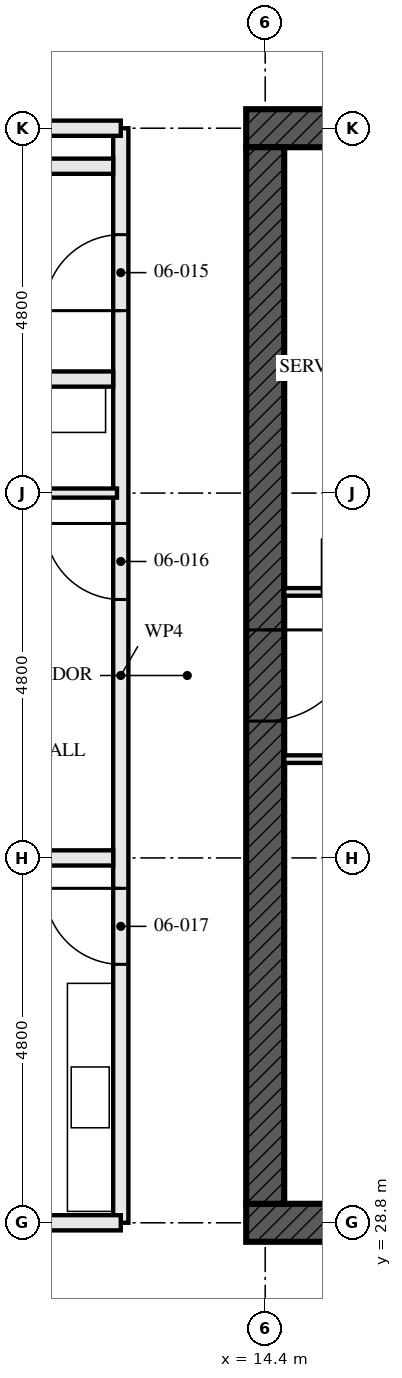
"""IFC4 building model, lengths in metres.
Left out: names, types, materials, properties, quantities, classifications, styles, units other than length and angle.
Written with IfcOpenShell. Run it as: python <this file> out.ifc"""

import sys

from ifc_helpers import new_model, si_unit, direction, frame, frame_2d, origin, place, context, subcontext, project, spatial, rectangle, extrude, element, fill, save


model = new_model("IFC4")
c1 = context("Model", 3, precision=1e-05, world=origin(), true_north=direction((0.0, 1.0)))
c2 = subcontext(c1, "Body", "Model", "MODEL_VIEW")
j1 = project(units=[si_unit("LENGTHUNIT", "METRE"), si_unit("PLANEANGLEUNIT", "RADIAN")], contexts=[c1])
p1 = place(None, origin())
s1 = spatial("IfcSite", under=j1, at=p1, CompositionType="ELEMENT")
p2 = place(p1, origin())
s2 = spatial("IfcBuilding", under=s1, at=p2, CompositionType="ELEMENT")
p3 = place(p2, frame((0.0, 0.0, 27.0)))
s3 = spatial("IfcBuildingStorey", under=s2, at=p3, CompositionType="ELEMENT", Elevation=27.0)
p4 = place(p3, frame((14.15, 28.8, -0.17), z_axis=(0.0, 0.0, 1.0), x_axis=(1.0, 0.0, 0.0)))
e1 = element("IfcWall", 1, at=p4, inside=s3, PredefinedType="SHEAR", context=c2, shape_type="SweptSolid", body=[
    extrude(rectangle(XDim=14.9, YDim=0.5, at=frame_2d((7.45, 0.0))), origin(), (0.0, 0.0, 1.0), 3.5),
])
p5 = place(p4, frame((6.85, 0.0, 0.17)))
e2 = element("IfcOpeningElement", 2, at=p5, cuts=e1, PredefinedType="OPENING", context=c2, shape_type="SweptSolid", body=[
    extrude(rectangle(XDim=1.2, YDim=2.1, at=frame_2d((0.6, 1.05))), frame((0.0, 0.26, 0.0), z_axis=(0.0, -1.0, 0.0), x_axis=(1.0, 0.0, 0.0)), (0.0, 0.0, 1.0), 0.521),
])
p6 = place(p3, frame((29.05, 43.2, -0.17), z_axis=(0.0, 0.0, 1.0), x_axis=(-1.0, 0.0, 0.0)))
e3 = element("IfcWall", 3, at=p6, inside=s3, PredefinedType="SHEAR", context=c2, shape_type="SweptSolid", body=[
    extrude(rectangle(XDim=14.9, YDim=0.5, at=frame_2d((7.45, 0.0))), origin(), (0.0, 0.0, 1.0), 3.5),
])
p7 = place(p6, frame((6.85, 0.0, 0.17)))
e4 = element("IfcOpeningElement", 4, at=p7, cuts=e3, PredefinedType="OPENING", context=c2, shape_type="SweptSolid", body=[
    extrude(rectangle(XDim=1.2, YDim=2.1, at=frame_2d((0.6, 1.05))), frame((0.0, 0.26, 0.0), z_axis=(0.0, -1.0, 0.0), x_axis=(1.0, 0.0, 0.0)), (0.0, 0.0, 1.0), 0.521),
])
p8 = place(p3, frame((14.4, 42.95, -0.17), z_axis=(0.0, 0.0, 1.0), x_axis=(0.0, -1.0, 0.0)))
e5 = element("IfcWall", 5, at=p8, inside=s3, PredefinedType="SHEAR", context=c2, shape_type="SweptSolid", body=[
    extrude(rectangle(XDim=13.9, YDim=0.5, at=frame_2d((6.95, 0.0))), origin(), (0.0, 0.0, 1.0), 3.5),
])
p9 = place(p8, frame((6.35, 0.0, 0.17)))
e6 = element("IfcOpeningElement", 6, at=p9, cuts=e5, PredefinedType="OPENING", context=c2, shape_type="SweptSolid", body=[
    extrude(rectangle(XDim=1.2, YDim=2.1, at=frame_2d((0.6, 1.05))), frame((0.0, 0.26, 0.0), z_axis=(0.0, -1.0, 0.0), x_axis=(1.0, 0.0, 0.0)), (0.0, 0.0, 1.0), 0.521),
])
for number, where, z_axis, x_axis in (
    (7, (7.7, 42.7, 0.0), (0.0, 0.0, 1.0), (1.0, 0.0, 0.0)),
    (8, (7.7, 39.9, 0.0), (0.0, 0.0, 1.0), (1.0, 0.0, 0.0)),
):
    element("IfcWall", number, at=place(p3, frame(where, z_axis=z_axis, x_axis=x_axis)), inside=s3, PredefinedType="SOLIDWALL", context=c2, shape_type="SweptSolid", body=[
        extrude(rectangle(XDim=4.7, YDim=0.2, at=frame_2d((2.35, 0.0))), origin(), (0.0, 0.0, 1.0), 2.99),
    ])
p10 = place(p3, frame((6.4, 38.4, 0.0), z_axis=(0.0, 0.0, 1.0), x_axis=(1.0, 0.0, 0.0)))
e9 = element("IfcWall", 9, at=p10, inside=s3, PredefinedType="PARTITIONING", context=c2, shape_type="SweptSolid", body=[
    extrude(rectangle(XDim=6.05, YDim=0.12, at=frame_2d((3.025, 0.0))), origin(), (0.0, 0.0, 1.0), 2.55),
])
p11 = place(p10, frame((2.575, 0.0, 0.0)))
e10 = element("IfcOpeningElement", 10, at=p11, cuts=e9, PredefinedType="OPENING", context=c2, shape_type="SweptSolid", body=[
    extrude(rectangle(XDim=0.9, YDim=2.1, at=frame_2d((0.45, 1.05))), frame((0.0, 0.071, 0.0), z_axis=(0.0, -1.0, 0.0), x_axis=(1.0, 0.0, 0.0)), (0.0, 0.0, 1.0), 0.141),
])
p12 = place(p3, frame((0.395, 33.6, 0.0), z_axis=(0.0, 0.0, 1.0), x_axis=(1.0, 0.0, 0.0)))
e11 = element("IfcWall", 11, at=p12, inside=s3, PredefinedType="PARTITIONING", context=c2, shape_type="SweptSolid", body=[
    extrude(rectangle(XDim=12.005, YDim=0.2, at=frame_2d((6.002, 0.0))), origin(), (0.0, 0.0, 1.0), 2.55),
])
p13 = place(p3, frame((12.5, 43.2, 0.0), z_axis=(0.0, 0.0, 1.0), x_axis=(0.0, -1.0, 0.0)))
e12 = element("IfcWall", 12, at=p13, inside=s3, PredefinedType="PARTITIONING", context=c2, shape_type="SweptSolid", body=[
    extrude(rectangle(XDim=14.4, YDim=0.2, at=frame_2d((7.2, 0.0))), origin(), (0.0, 0.0, 1.0), 2.55),
])
p14 = place(p13, frame((1.4, 0.0, 0.0)))
e13 = element("IfcOpeningElement", 13, at=p14, cuts=e12, PredefinedType="OPENING", context=c2, shape_type="SweptSolid", body=[
    extrude(rectangle(XDim=1.0, YDim=2.1, at=frame_2d((0.5, 1.05))), frame((0.0, 0.111, 0.0), z_axis=(0.0, -1.0, 0.0), x_axis=(1.0, 0.0, 0.0)), (0.0, 0.0, 1.0), 0.221),
])
p15 = place(p13, frame((5.2, 0.0, 0.0)))
e14 = element("IfcOpeningElement", 14, at=p15, cuts=e12, PredefinedType="OPENING", context=c2, shape_type="SweptSolid", body=[
    extrude(rectangle(XDim=1.0, YDim=2.1, at=frame_2d((0.5, 1.05))), frame((0.0, 0.111, 0.0), z_axis=(0.0, -1.0, 0.0), x_axis=(1.0, 0.0, 0.0)), (0.0, 0.0, 1.0), 0.221),
])
p16 = place(p13, frame((10.0, 0.0, 0.0)))
e15 = element("IfcOpeningElement", 15, at=p16, cuts=e12, PredefinedType="OPENING", context=c2, shape_type="SweptSolid", body=[
    extrude(rectangle(XDim=1.0, YDim=2.1, at=frame_2d((0.5, 1.05))), frame((0.0, 0.111, 0.0), z_axis=(0.0, -1.0, 0.0), x_axis=(1.0, 0.0, 0.0)), (0.0, 0.0, 1.0), 0.221),
])
p17 = place(p3, frame((14.65, 34.9, 0.0), z_axis=(0.0, 0.0, 1.0), x_axis=(1.0, 0.0, 0.0)))
e16 = element("IfcWall", 16, at=p17, inside=s3, PredefinedType="SOLIDWALL", context=c2, shape_type="SweptSolid", body=[
    extrude(rectangle(XDim=5.9, YDim=0.1, at=frame_2d((2.95, 0.0))), origin(), (0.0, 0.0, 1.0), 3.33),
])
p18 = place(p17, frame((1.6, 0.0, 0.0)))
e17 = element("IfcOpeningElement", 17, at=p18, cuts=e16, PredefinedType="OPENING", context=c2, shape_type="SweptSolid", body=[
    extrude(rectangle(XDim=0.7, YDim=2.1, at=frame_2d((0.35, 1.05))), frame((0.0, 0.061, 0.0), z_axis=(0.0, -1.0, 0.0), x_axis=(1.0, 0.0, 0.0)), (0.0, 0.0, 1.0), 0.121),
])
p19 = place(p3, frame((14.65, 37.1, 0.0), z_axis=(0.0, 0.0, 1.0), x_axis=(1.0, 0.0, 0.0)))
e18 = element("IfcWall", 18, at=p19, inside=s3, PredefinedType="SOLIDWALL", context=c2, shape_type="SweptSolid", body=[
    extrude(rectangle(XDim=5.9, YDim=0.1, at=frame_2d((2.95, 0.0))), origin(), (0.0, 0.0, 1.0), 3.33),
])
p20 = place(p19, frame((0.5, 0.0, 0.0)))
e19 = element("IfcOpeningElement", 19, at=p20, cuts=e18, PredefinedType="OPENING", context=c2, shape_type="SweptSolid", body=[
    extrude(rectangle(XDim=0.7, YDim=2.1, at=frame_2d((0.35, 1.05))), frame((0.0, 0.061, 0.0), z_axis=(0.0, -1.0, 0.0), x_axis=(1.0, 0.0, 0.0)), (0.0, 0.0, 1.0), 0.121),
])
p21 = place(p19, frame((1.85, 0.0, 0.0)))
e20 = element("IfcOpeningElement", 20, at=p21, cuts=e18, PredefinedType="OPENING", context=c2, shape_type="SweptSolid", body=[
    extrude(rectangle(XDim=0.9, YDim=2.1, at=frame_2d((0.45, 1.05))), frame((0.0, 0.061, 0.0), z_axis=(0.0, -1.0, 0.0), x_axis=(1.0, 0.0, 0.0)), (0.0, 0.0, 1.0), 0.121),
])
for number, where, z_axis, x_axis in (
    (21, (12.5, 28.8, 0.0), (0.0, 0.0, 1.0), (-1.0, 0.0, 0.0)),
    (22, (12.5, 43.2, 0.0), (0.0, 0.0, 1.0), (-1.0, 0.0, 0.0)),
):
    element("IfcWall", number, at=place(p3, frame(where, z_axis=z_axis, x_axis=x_axis)), inside=s3, PredefinedType="PARTITIONING", context=c2, shape_type="SweptSolid", body=[
        extrude(rectangle(XDim=2.505, YDim=0.2, at=frame_2d((1.252, 0.0))), origin(), (0.0, 0.0, 1.0), 2.32),
    ])
p22 = place(p14, frame((1.0, 0.0, 0.0), z_axis=(0.0, 0.0, 1.0), x_axis=(-1.0, 0.0, 0.0)))
e23 = element("IfcDoor", 23, at=p22, inside=s3, OperationType="SINGLE_SWING_RIGHT", PredefinedType="DOOR", context=c2, shape_type="SweptSolid", body=[
    extrude(rectangle(XDim=1.0, YDim=2.1, at=frame_2d((0.5, 1.05))), frame((0.0, 0.032, 0.0), z_axis=(0.0, -1.0, 0.0), x_axis=(1.0, 0.0, 0.0)), (0.0, 0.0, 1.0), 0.064),
])
fill(e13, e23)
p23 = place(p15, frame((1.0, 0.0, 0.0), z_axis=(0.0, 0.0, 1.0), x_axis=(-1.0, 0.0, 0.0)))
e24 = element("IfcDoor", 24, at=p23, inside=s3, OperationType="SINGLE_SWING_LEFT", PredefinedType="DOOR", context=c2, shape_type="SweptSolid", body=[
    extrude(rectangle(XDim=1.0, YDim=2.1, at=frame_2d((0.5, 1.05))), frame((0.0, 0.027, 0.0), z_axis=(0.0, -1.0, 0.0), x_axis=(1.0, 0.0, 0.0)), (0.0, 0.0, 1.0), 0.054),
])
fill(e14, e24)
p24 = place(p16, frame((1.0, 0.0, 0.0), z_axis=(0.0, 0.0, 1.0), x_axis=(-1.0, 0.0, 0.0)))
e25 = element("IfcDoor", 25, at=p24, inside=s3, OperationType="SINGLE_SWING_LEFT", PredefinedType="DOOR", context=c2, shape_type="SweptSolid", body=[
    extrude(rectangle(XDim=1.0, YDim=2.1, at=frame_2d((0.5, 1.05))), frame((0.0, 0.027, 0.0), z_axis=(0.0, -1.0, 0.0), x_axis=(1.0, 0.0, 0.0)), (0.0, 0.0, 1.0), 0.054),
])
fill(e15, e25)
p25 = place(p9, origin())
e26 = element("IfcDoor", 26, at=p25, inside=s3, OperationType="SINGLE_SWING_LEFT", PredefinedType="DOOR", context=c2, shape_type="SweptSolid", body=[
    extrude(rectangle(XDim=1.2, YDim=2.1, at=frame_2d((0.6, 1.05))), frame((0.0, 0.027, 0.0), z_axis=(0.0, -1.0, 0.0), x_axis=(1.0, 0.0, 0.0)), (0.0, 0.0, 1.0), 0.054),
])
fill(e6, e26)
save(model, sys.argv[1])
